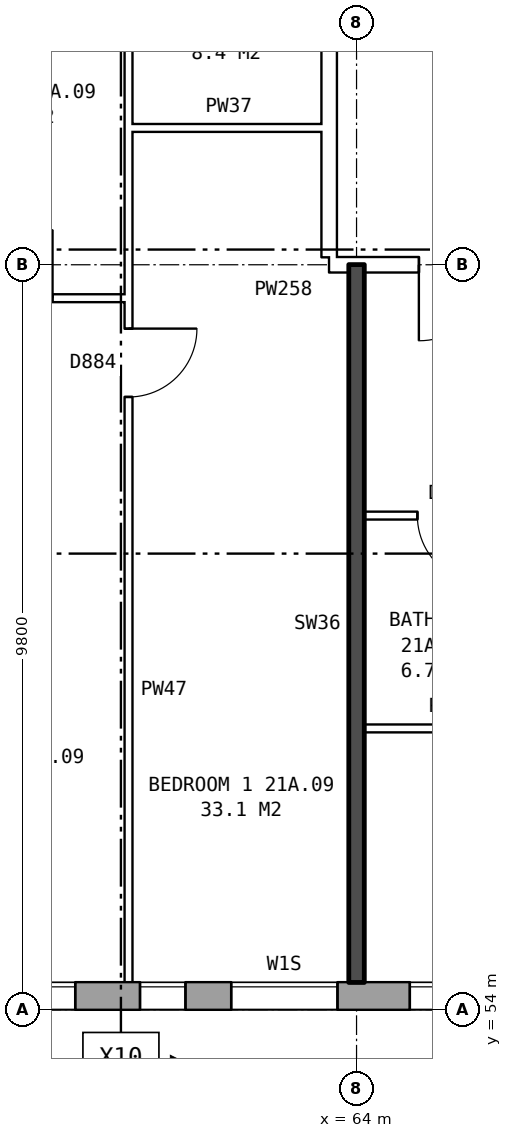
"""IFC4 building model, lengths in metres.
Left out: names, types, materials, properties, quantities, classifications, styles, units other than length and angle.
Written with IfcOpenShell. Run it as: python <this file> out.ifc"""

import sys

from ifc_helpers import new_model, si_unit, direction, frame, frame_2d, origin, place, context, subcontext, project, spatial, rectangle, extrude, element, fill, save


model = new_model("IFC4")
c1 = context("Model", 3, precision=1e-05, world=origin(), true_north=direction((0.0, 1.0)))
c2 = subcontext(c1, "Body", "Model", "MODEL_VIEW")
j1 = project(units=[si_unit("LENGTHUNIT", "METRE"), si_unit("PLANEANGLEUNIT", "RADIAN")], contexts=[c1])
p1 = place(None, origin())
s1 = spatial("IfcSite", under=j1, at=p1, CompositionType="ELEMENT")
p2 = place(p1, origin())
s2 = spatial("IfcBuilding", under=s1, at=p2, CompositionType="ELEMENT")
p3 = place(p2, frame((0.0, 0.0, 77.8)))
s3 = spatial("IfcBuildingStorey", under=s2, at=p3, CompositionType="ELEMENT", Elevation=77.8)
p4 = place(p3, frame((26.325, 54.18, 0.0), z_axis=(0.0, 0.0, 1.0), x_axis=(1.0, 0.0, 0.0)))
e1 = element("IfcWall", 1, at=p4, inside=s3, PredefinedType="STANDARD", context=c2, shape_type="SweptSolid", body=[
    extrude(rectangle(XDim=46.601, YDim=0.36, at=frame_2d((23.3, 0.0))), origin(), (0.0, 0.0, 1.0), 2.85),
])
p5 = place(p4, frame((2.375, 0.0, 0.8)))
e2 = element("IfcOpeningElement", 2, at=p5, cuts=e1, PredefinedType="OPENING", context=c2, shape_type="SweptSolid", body=[
    extrude(rectangle(XDim=1.6, YDim=1.8, at=frame_2d((0.8, 0.9))), frame((0.0, 0.19, 0.0), z_axis=(0.0, -1.0, 0.0), x_axis=(1.0, 0.0, 0.0)), (0.0, 0.0, 1.0), 0.38),
])
p6 = place(p4, frame((5.375, 0.0, 0.8)))
e3 = element("IfcOpeningElement", 3, at=p6, cuts=e1, PredefinedType="OPENING", context=c2, shape_type="SweptSolid", body=[
    extrude(rectangle(XDim=1.6, YDim=1.8, at=frame_2d((0.8, 0.9))), frame((0.0, 0.19, 0.0), z_axis=(0.0, -1.0, 0.0), x_axis=(1.0, 0.0, 0.0)), (0.0, 0.0, 1.0), 0.38),
])
p7 = place(p4, frame((7.875, 0.0, 0.8)))
e4 = element("IfcOpeningElement", 4, at=p7, cuts=e1, PredefinedType="OPENING", context=c2, shape_type="SweptSolid", body=[
    extrude(rectangle(XDim=1.6, YDim=1.8, at=frame_2d((0.8, 0.9))), frame((0.0, 0.19, 0.0), z_axis=(0.0, -1.0, 0.0), x_axis=(1.0, 0.0, 0.0)), (0.0, 0.0, 1.0), 0.38),
])
p8 = place(p4, frame((11.725, 0.0, 0.65)))
e5 = element("IfcOpeningElement", 5, at=p8, cuts=e1, PredefinedType="OPENING", context=c2, shape_type="SweptSolid", body=[
    extrude(rectangle(XDim=0.8, YDim=0.9, at=frame_2d((0.4, 0.45))), frame((0.0, 0.19, 0.0), z_axis=(0.0, -1.0, 0.0), x_axis=(1.0, 0.0, 0.0)), (0.0, 0.0, 1.0), 0.38),
])
p9 = place(p4, frame((14.375, 0.0, 0.8)))
e6 = element("IfcOpeningElement", 6, at=p9, cuts=e1, PredefinedType="OPENING", context=c2, shape_type="SweptSolid", body=[
    extrude(rectangle(XDim=1.6, YDim=1.8, at=frame_2d((0.8, 0.9))), frame((0.0, 0.19, 0.0), z_axis=(0.0, -1.0, 0.0), x_axis=(1.0, 0.0, 0.0)), (0.0, 0.0, 1.0), 0.38),
])
p10 = place(p4, frame((17.375, 0.0, 0.8)))
e7 = element("IfcOpeningElement", 7, at=p10, cuts=e1, PredefinedType="OPENING", context=c2, shape_type="SweptSolid", body=[
    extrude(rectangle(XDim=1.6, YDim=1.8, at=frame_2d((0.8, 0.9))), frame((0.0, 0.19, 0.0), z_axis=(0.0, -1.0, 0.0), x_axis=(1.0, 0.0, 0.0)), (0.0, 0.0, 1.0), 0.38),
])
p11 = place(p4, frame((20.375, 0.0, 0.8)))
e8 = element("IfcOpeningElement", 8, at=p11, cuts=e1, PredefinedType="OPENING", context=c2, shape_type="SweptSolid", body=[
    extrude(rectangle(XDim=1.6, YDim=1.8, at=frame_2d((0.8, 0.9))), frame((0.0, 0.19, 0.0), z_axis=(0.0, -1.0, 0.0), x_axis=(1.0, 0.0, 0.0)), (0.0, 0.0, 1.0), 0.38),
])
p12 = place(p4, frame((23.375, 0.0, 0.8)))
e9 = element("IfcOpeningElement", 9, at=p12, cuts=e1, PredefinedType="OPENING", context=c2, shape_type="SweptSolid", body=[
    extrude(rectangle(XDim=1.6, YDim=1.8, at=frame_2d((0.8, 0.9))), frame((0.0, 0.19, 0.0), z_axis=(0.0, -1.0, 0.0), x_axis=(1.0, 0.0, 0.0)), (0.0, 0.0, 1.0), 0.38),
])
p13 = place(p4, frame((26.375, 0.0, 0.8)))
e10 = element("IfcOpeningElement", 10, at=p13, cuts=e1, PredefinedType="OPENING", context=c2, shape_type="SweptSolid", body=[
    extrude(rectangle(XDim=1.6, YDim=1.8, at=frame_2d((0.8, 0.9))), frame((0.0, 0.19, 0.0), z_axis=(0.0, -1.0, 0.0), x_axis=(1.0, 0.0, 0.0)), (0.0, 0.0, 1.0), 0.38),
])
p14 = place(p4, frame((29.375, 0.0, 0.8)))
e11 = element("IfcOpeningElement", 11, at=p14, cuts=e1, PredefinedType="OPENING", context=c2, shape_type="SweptSolid", body=[
    extrude(rectangle(XDim=1.6, YDim=1.8, at=frame_2d((0.8, 0.9))), frame((0.0, 0.19, 0.0), z_axis=(0.0, -1.0, 0.0), x_axis=(1.0, 0.0, 0.0)), (0.0, 0.0, 1.0), 0.38),
])
p15 = place(p4, frame((32.375, 0.0, 0.8)))
e12 = element("IfcOpeningElement", 12, at=p15, cuts=e1, PredefinedType="OPENING", context=c2, shape_type="SweptSolid", body=[
    extrude(rectangle(XDim=1.6, YDim=1.8, at=frame_2d((0.8, 0.9))), frame((0.0, 0.19, 0.0), z_axis=(0.0, -1.0, 0.0), x_axis=(1.0, 0.0, 0.0)), (0.0, 0.0, 1.0), 0.38),
])
p16 = place(p4, frame((34.825, 0.0, 0.15)))
e13 = element("IfcOpeningElement", 13, at=p16, cuts=e1, PredefinedType="OPENING", context=c2, shape_type="SweptSolid", body=[
    extrude(rectangle(XDim=0.6, YDim=0.9, at=frame_2d((0.3, 0.45))), frame((0.0, 0.19, 0.0), z_axis=(0.0, -1.0, 0.0), x_axis=(1.0, 0.0, 0.0)), (0.0, 0.0, 1.0), 0.38),
])
p17 = place(p4, frame((38.375, 0.0, 0.8)))
e14 = element("IfcOpeningElement", 14, at=p17, cuts=e1, PredefinedType="OPENING", context=c2, shape_type="SweptSolid", body=[
    extrude(rectangle(XDim=1.6, YDim=1.8, at=frame_2d((0.8, 0.9))), frame((0.0, 0.19, 0.0), z_axis=(0.0, -1.0, 0.0), x_axis=(1.0, 0.0, 0.0)), (0.0, 0.0, 1.0), 0.38),
])
p18 = place(p4, frame((41.375, 0.0, 0.8)))
e15 = element("IfcOpeningElement", 15, at=p18, cuts=e1, PredefinedType="OPENING", context=c2, shape_type="SweptSolid", body=[
    extrude(rectangle(XDim=1.6, YDim=1.8, at=frame_2d((0.8, 0.9))), frame((0.0, 0.19, 0.0), z_axis=(0.0, -1.0, 0.0), x_axis=(1.0, 0.0, 0.0)), (0.0, 0.0, 1.0), 0.38),
])
p19 = place(p4, frame((44.375, 0.0, 0.8)))
e16 = element("IfcOpeningElement", 16, at=p19, cuts=e1, PredefinedType="OPENING", context=c2, shape_type="SweptSolid", body=[
    extrude(rectangle(XDim=1.6, YDim=1.8, at=frame_2d((0.8, 0.9))), frame((0.0, 0.19, 0.0), z_axis=(0.0, -1.0, 0.0), x_axis=(1.0, 0.0, 0.0)), (0.0, 0.0, 1.0), 0.38),
])
p20 = place(p4, frame((9.775, 0.0, 1.5)))
e17 = element("IfcOpeningElement", 17, at=p20, cuts=e1, PredefinedType="OPENING", context=c2, shape_type="SweptSolid", body=[
    extrude(rectangle(XDim=0.6, YDim=0.9, at=frame_2d((0.3, 0.45))), frame((0.0, 0.19, 0.0), z_axis=(0.0, -1.0, 0.0), x_axis=(1.0, 0.0, 0.0)), (0.0, 0.0, 1.0), 0.38),
])
p21 = place(p4, frame((12.825, 0.0, 0.65)))
e18 = element("IfcOpeningElement", 18, at=p21, cuts=e1, PredefinedType="OPENING", context=c2, shape_type="SweptSolid", body=[
    extrude(rectangle(XDim=0.6, YDim=1.8, at=frame_2d((0.3, 0.9))), frame((0.0, 0.19, 0.0), z_axis=(0.0, -1.0, 0.0), x_axis=(1.0, 0.0, 0.0)), (0.0, 0.0, 1.0), 0.38),
])
p22 = place(p4, frame((36.025, 0.0, 1.65)))
e19 = element("IfcOpeningElement", 19, at=p22, cuts=e1, PredefinedType="OPENING", context=c2, shape_type="SweptSolid", body=[
    extrude(rectangle(XDim=1.4, YDim=0.9, at=frame_2d((0.7, 0.45))), frame((0.0, 0.19, 0.0), z_axis=(0.0, -1.0, 0.0), x_axis=(1.0, 0.0, 0.0)), (0.0, 0.0, 1.0), 0.38),
])
p23 = place(p3, frame((63.64, 63.9, 0.0), z_axis=(0.0, 0.0, 1.0), x_axis=(0.0, 1.0, 0.0)))
e20 = element("IfcWall", 20, at=p23, inside=s3, PredefinedType="PARTITIONING", context=c2, shape_type="SweptSolid", body=[
    extrude(rectangle(XDim=12.2, YDim=0.2, at=frame_2d((6.1, 0.0))), origin(), (0.0, 0.0, 1.0), 2.85),
])
p24 = place(p23, frame((5.1, 0.0, 0.0)))
e21 = element("IfcOpeningElement", 21, at=p24, cuts=e20, PredefinedType="OPENING", context=c2, shape_type="SweptSolid", body=[
    extrude(rectangle(XDim=2.0, YDim=2.1, at=frame_2d((1.0, 1.05))), frame((0.0, 0.11, 0.0), z_axis=(0.0, -1.0, 0.0), x_axis=(1.0, 0.0, 0.0)), (0.0, 0.0, 1.0), 0.22),
])
p25 = place(p3, frame((64.1, 57.7, 0.0), z_axis=(0.0, 0.0, 1.0), x_axis=(1.0, 0.0, 0.0)))
e22 = element("IfcWall", 22, at=p25, inside=s3, PredefinedType="PARTITIONING", context=c2, shape_type="SweptSolid", body=[
    extrude(rectangle(XDim=2.3, YDim=0.1, at=frame_2d((1.15, 0.0))), origin(), (0.0, 0.0, 1.0), 2.85),
])
p26 = place(p3, frame((64.1, 60.5, 0.0), z_axis=(0.0, 0.0, 1.0), x_axis=(1.0, 0.0, 0.0)))
e23 = element("IfcWall", 23, at=p26, inside=s3, PredefinedType="PARTITIONING", context=c2, shape_type="SweptSolid", body=[
    extrude(rectangle(XDim=5.8, YDim=0.1, at=frame_2d((2.9, 0.0))), origin(), (0.0, 0.0, 1.0), 2.85),
])
p27 = place(p26, frame((3.6, 0.0, 0.0)))
e24 = element("IfcOpeningElement", 24, at=p27, cuts=e23, PredefinedType="OPENING", context=c2, shape_type="SweptSolid", body=[
    extrude(rectangle(XDim=0.9, YDim=2.1, at=frame_2d((0.45, 1.05))), frame((0.0, 0.06, 0.0), z_axis=(0.0, -1.0, 0.0), x_axis=(1.0, 0.0, 0.0)), (0.0, 0.0, 1.0), 0.12),
])
p28 = place(p26, frame((0.7, 0.0, 0.0)))
e25 = element("IfcOpeningElement", 25, at=p28, cuts=e23, PredefinedType="OPENING", context=c2, shape_type="SweptSolid", body=[
    extrude(rectangle(XDim=0.9, YDim=2.1, at=frame_2d((0.45, 1.05))), frame((0.0, 0.06, 0.0), z_axis=(0.0, -1.0, 0.0), x_axis=(1.0, 0.0, 0.0)), (0.0, 0.0, 1.0), 0.12),
])
p29 = place(p3, frame((58.1, 63.36, 0.0), z_axis=(0.0, 0.0, 1.0), x_axis=(1.0, 0.0, 0.0)))
e26 = element("IfcWall", 26, at=p29, inside=s3, PredefinedType="PARTITIONING", context=c2, shape_type="SweptSolid", body=[
    extrude(rectangle(XDim=2.9, YDim=0.1, at=frame_2d((1.45, 0.0))), origin(), (0.0, 0.0, 1.0), 2.85),
])
p30 = place(p29, frame((1.0, 0.0, 0.0)))
e27 = element("IfcOpeningElement", 27, at=p30, cuts=e26, PredefinedType="OPENING", context=c2, shape_type="SweptSolid", body=[
    extrude(rectangle(XDim=0.9, YDim=2.1, at=frame_2d((0.45, 1.05))), frame((0.0, 0.06, 0.0), z_axis=(0.0, -1.0, 0.0), x_axis=(1.0, 0.0, 0.0)), (0.0, 0.0, 1.0), 0.12),
])
p31 = place(p3, frame((63.64, 63.8, 0.0), z_axis=(0.0, 0.0, 1.0), x_axis=(1.0, 0.0, 0.0)))
e28 = element("IfcWall", 28, at=p31, inside=s3, PredefinedType="PARTITIONING", context=c2, shape_type="SweptSolid", body=[
    extrude(rectangle(XDim=3.0, YDim=0.2, at=frame_2d((1.5, 0.0))), origin(), (0.0, 0.0, 1.0), 2.85),
])
p32 = place(p31, frame((1.18, 0.0, 0.0)))
e29 = element("IfcOpeningElement", 29, at=p32, cuts=e28, PredefinedType="OPENING", context=c2, shape_type="SweptSolid", body=[
    extrude(rectangle(XDim=1.0, YDim=2.1, at=frame_2d((0.5, 1.05))), frame((0.0, 0.11, 0.0), z_axis=(0.0, -1.0, 0.0), x_axis=(1.0, 0.0, 0.0)), (0.0, 0.0, 1.0), 0.22),
])
p33 = place(p3, frame((61.0, 65.6, 0.0), z_axis=(0.0, 0.0, 1.0), x_axis=(1.0, 0.0, 0.0)))
e30 = element("IfcWall", 30, at=p33, inside=s3, PredefinedType="PARTITIONING", context=c2, shape_type="SweptSolid", body=[
    extrude(rectangle(XDim=2.64, YDim=0.1, at=frame_2d((1.32, 0.0))), origin(), (0.0, 0.0, 1.0), 2.85),
])
p34 = place(p3, frame((61.0, 54.36, 0.0), z_axis=(0.0, 0.0, 1.0), x_axis=(0.0, 1.0, 0.0)))
e31 = element("IfcWall", 31, at=p34, inside=s3, PredefinedType="PARTITIONING", context=c2, shape_type="SweptSolid", body=[
    extrude(rectangle(XDim=14.34, YDim=0.1, at=frame_2d((7.17, 0.0))), origin(), (0.0, 0.0, 1.0), 2.85),
])
p35 = place(p34, frame((7.7, 0.0, 0.0)))
e32 = element("IfcOpeningElement", 32, at=p35, cuts=e31, PredefinedType="OPENING", context=c2, shape_type="SweptSolid", body=[
    extrude(rectangle(XDim=0.9, YDim=2.1, at=frame_2d((0.45, 1.05))), frame((0.0, 0.06, 0.0), z_axis=(0.0, -1.0, 0.0), x_axis=(1.0, 0.0, 0.0)), (0.0, 0.0, 1.0), 0.12),
])
p36 = place(p34, frame((13.04, 0.0, 0.0)))
e33 = element("IfcOpeningElement", 33, at=p36, cuts=e31, PredefinedType="OPENING", context=c2, shape_type="SweptSolid", body=[
    extrude(rectangle(XDim=0.9, YDim=2.1, at=frame_2d((0.45, 1.05))), frame((0.0, 0.06, 0.0), z_axis=(0.0, -1.0, 0.0), x_axis=(1.0, 0.0, 0.0)), (0.0, 0.0, 1.0), 0.12),
])
p37 = place(p3, frame((64.0, 54.36, 0.0), z_axis=(0.0, 0.0, 1.0), x_axis=(0.0, 1.0, 0.0)))
e34 = element("IfcWall", 34, at=p37, inside=s3, PredefinedType="SOLIDWALL", context=c2, shape_type="SweptSolid", body=[
    extrude(rectangle(XDim=9.44, YDim=0.2, at=frame_2d((4.72, 0.0))), origin(), (0.0, 0.0, 1.0), 2.85),
])
p38 = place(p15, origin())
e35 = element("IfcWindow", 35, at=p38, inside=s3, PartitioningType="SINGLE_PANEL", PredefinedType="WINDOW", context=c2, shape_type="SweptSolid", body=[
    extrude(rectangle(XDim=1.6, YDim=1.8, at=frame_2d((0.8, 0.9))), frame((0.0, 0.15, 0.0), z_axis=(0.0, -1.0, 0.0), x_axis=(1.0, 0.0, 0.0)), (0.0, 0.0, 1.0), 0.06),
])
fill(e12, e35)
p39 = place(p16, origin())
e36 = element("IfcWindow", 36, at=p39, inside=s3, PartitioningType="SINGLE_PANEL", PredefinedType="WINDOW", context=c2, shape_type="SweptSolid", body=[
    extrude(rectangle(XDim=0.6, YDim=0.9, at=frame_2d((0.3, 0.45))), frame((0.0, 0.15, 0.0), z_axis=(0.0, -1.0, 0.0), x_axis=(1.0, 0.0, 0.0)), (0.0, 0.0, 1.0), 0.06),
])
fill(e13, e36)
p40 = place(p17, origin())
e37 = element("IfcWindow", 37, at=p40, inside=s3, PartitioningType="SINGLE_PANEL", PredefinedType="WINDOW", context=c2, shape_type="SweptSolid", body=[
    extrude(rectangle(XDim=1.6, YDim=1.8, at=frame_2d((0.8, 0.9))), frame((0.0, 0.15, 0.0), z_axis=(0.0, -1.0, 0.0), x_axis=(1.0, 0.0, 0.0)), (0.0, 0.0, 1.0), 0.06),
])
fill(e14, e37)
p41 = place(p32, frame((1.0, 0.0, 0.0), z_axis=(0.0, 0.0, 1.0), x_axis=(-1.0, 0.0, 0.0)))
e38 = element("IfcDoor", 38, at=p41, inside=s3, OperationType="SINGLE_SWING_RIGHT", PredefinedType="DOOR", context=c2, shape_type="SweptSolid", body=[
    extrude(rectangle(XDim=1.0, YDim=2.1, at=frame_2d((0.5, 1.05))), frame((0.0, 0.025, 0.0), z_axis=(0.0, -1.0, 0.0), x_axis=(1.0, 0.0, 0.0)), (0.0, 0.0, 1.0), 0.05),
])
fill(e29, e38)
p42 = place(p28, frame((0.9, 0.0, 0.0), z_axis=(0.0, 0.0, 1.0), x_axis=(-1.0, 0.0, 0.0)))
e39 = element("IfcDoor", 39, at=p42, inside=s3, OperationType="SINGLE_SWING_LEFT", PredefinedType="DOOR", context=c2, shape_type="SweptSolid", body=[
    extrude(rectangle(XDim=0.9, YDim=2.1, at=frame_2d((0.45, 1.05))), frame((0.0, 0.025, 0.0), z_axis=(0.0, -1.0, 0.0), x_axis=(1.0, 0.0, 0.0)), (0.0, 0.0, 1.0), 0.05),
])
fill(e25, e39)
p43 = place(p35, frame((0.9, 0.0, 0.0), z_axis=(0.0, 0.0, 1.0), x_axis=(-1.0, 0.0, 0.0)))
e40 = element("IfcDoor", 40, at=p43, inside=s3, OperationType="SINGLE_SWING_LEFT", PredefinedType="DOOR", context=c2, shape_type="SweptSolid", body=[
    extrude(rectangle(XDim=0.9, YDim=2.1, at=frame_2d((0.45, 1.05))), frame((0.0, 0.025, 0.0), z_axis=(0.0, -1.0, 0.0), x_axis=(1.0, 0.0, 0.0)), (0.0, 0.0, 1.0), 0.05),
])
fill(e32, e40)
p44 = place(p22, origin())
e41 = element("IfcWindow", 41, at=p44, inside=s3, PartitioningType="SINGLE_PANEL", PredefinedType="WINDOW", context=c2, shape_type="SweptSolid", body=[
    extrude(rectangle(XDim=1.4, YDim=0.9, at=frame_2d((0.7, 0.45))), frame((0.0, 0.15, 0.0), z_axis=(0.0, -1.0, 0.0), x_axis=(1.0, 0.0, 0.0)), (0.0, 0.0, 1.0), 0.06),
])
fill(e19, e41)
save(model, sys.argv[1])
